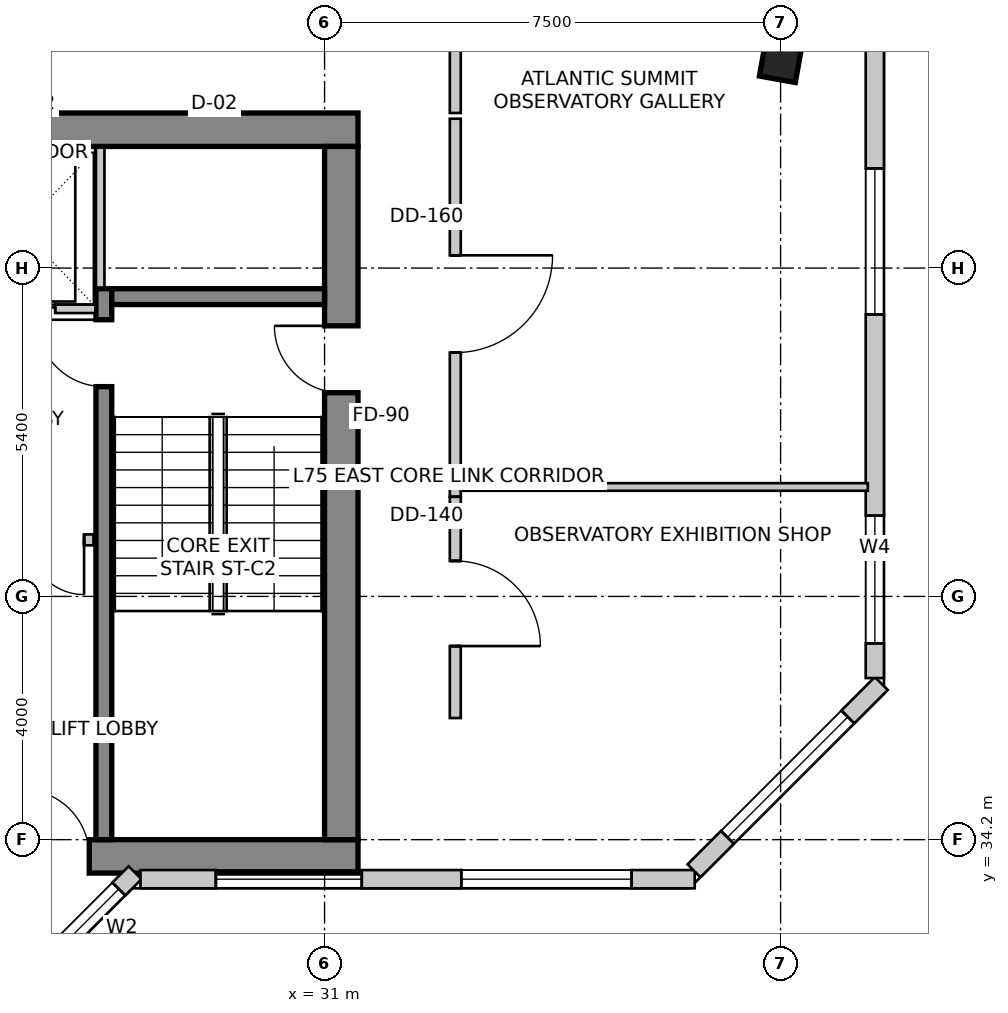
"""IFC4 building model, lengths in metres.
Left out: names, types, materials, properties, quantities, classifications, styles, units other than length and angle.
Written with IfcOpenShell. Run it as: python <this file> out.ifc"""

import sys

from ifc_helpers import new_model, si_unit, direction, frame, frame_2d, origin, origin_2d, place, context, subcontext, project, spatial, rectangle, extrude, source, transform, mapped, element, fill, save


model = new_model("IFC4")
c1 = context("Model", 3, precision=1e-05, world=origin(), true_north=direction((0.0, 1.0)))
c2 = subcontext(c1, "Body", "Model", "MODEL_VIEW")
j1 = project(units=[si_unit("LENGTHUNIT", "METRE"), si_unit("PLANEANGLEUNIT", "RADIAN")], contexts=[c1])
p1 = place(None, origin())
s1 = spatial("IfcSite", under=j1, at=p1, CompositionType="ELEMENT")
p2 = place(p1, origin())
s2 = spatial("IfcBuilding", under=s1, at=p2, CompositionType="ELEMENT")
p3 = place(p2, frame((0.0, 0.0, 292.5)))
s3 = spatial("IfcBuildingStorey", under=s2, at=p3, CompositionType="ELEMENT", Elevation=292.5)
p4 = place(p3, frame((16.05, 45.875, 0.0), z_axis=(0.0, 0.0, 1.0), x_axis=(1.0, 0.0, 0.0)))
e1 = element("IfcWall", 1, at=p4, inside=s3, PredefinedType="SHEAR", context=c2, shape_type="SweptSolid", body=[
    extrude(rectangle(XDim=15.5, YDim=0.55, at=frame_2d((7.75, 0.0))), origin(), (0.0, 0.0, 1.0), 4.0),
])
p5 = place(p3, frame((16.05, 33.925, 0.0), z_axis=(0.0, 0.0, 1.0), x_axis=(1.0, 0.0, 0.0)))
e2 = element("IfcWall", 2, at=p5, inside=s3, PredefinedType="SHEAR", context=c2, shape_type="SweptSolid", body=[
    extrude(rectangle(XDim=15.5, YDim=0.55, at=frame_2d((7.75, 0.0))), origin(), (0.0, 0.0, 1.0), 4.0),
])
m1 = source(origin(), c2, "Body", "SweptSolid", [
    extrude(rectangle(XDim=1.1, YDim=2.15, at=frame_2d((0.55, 1.075))), frame((0.0, 0.285, 0.0), z_axis=(0.0, -1.0, 0.0), x_axis=(1.0, 0.0, 0.0)), (0.0, 0.0, 1.0), 0.57),
])
p6 = place(p5, frame((9.98, 0.0, 0.0)))
e3 = element("IfcOpeningElement", 3, at=p6, cuts=e2, PredefinedType="OPENING", context=c2, shape_type="MappedRepresentation", body=[
    mapped(m1, transform((0.0, 0.0, 0.0), scale=1.0)),
])
p7 = place(p3, frame((31.275, 34.2, 0.0), z_axis=(0.0, 0.0, 1.0), x_axis=(0.0, 1.0, 0.0)))
e4 = element("IfcWall", 4, at=p7, inside=s3, PredefinedType="SHEAR", context=c2, shape_type="SweptSolid", body=[
    extrude(rectangle(XDim=11.4, YDim=0.55, at=frame_2d((5.7, 0.0))), origin(), (0.0, 0.0, 1.0), 4.0),
])
p8 = place(p7, frame((7.35, 0.0, 0.0)))
e5 = element("IfcOpeningElement", 5, at=p8, cuts=e4, PredefinedType="OPENING", context=c2, shape_type="MappedRepresentation", body=[
    mapped(m1, transform((0.0, 0.0, 0.0), scale=1.0)),
])
p9 = place(p3, frame((27.37, 34.2, 0.0), z_axis=(0.0, 0.0, 1.0), x_axis=(0.0, 1.0, 0.0)))
e6 = element("IfcWall", 6, at=p9, inside=s3, PredefinedType="SHEAR", context=c2, shape_type="SweptSolid", body=[
    extrude(rectangle(XDim=9.06, YDim=0.26, at=frame_2d((4.53, 0.0))), origin(), (0.0, 0.0, 1.0), 4.0),
])
m2 = source(origin(), c2, "Body", "SweptSolid", [
    extrude(rectangle(XDim=1.1, YDim=2.15, at=frame_2d((0.55, 1.075))), frame((0.0, 0.14, 0.0), z_axis=(0.0, -1.0, 0.0), x_axis=(1.0, 0.0, 0.0)), (0.0, 0.0, 1.0), 0.28),
])
p10 = place(p9, frame((7.45, 0.0, 0.0)))
e7 = element("IfcOpeningElement", 7, at=p10, cuts=e6, PredefinedType="OPENING", context=c2, shape_type="MappedRepresentation", body=[
    mapped(m2, transform((0.0, 0.0, 0.0), scale=1.0)),
])
p11 = place(p3, frame((27.5, 43.13, 0.0), z_axis=(0.0, 0.0, 1.0), x_axis=(1.0, 0.0, 0.0)))
e8 = element("IfcWall", 8, at=p11, inside=s3, PredefinedType="SHEAR", context=c2, shape_type="SweptSolid", body=[
    extrude(rectangle(XDim=3.5, YDim=0.26, at=frame_2d((1.75, 0.0))), origin(), (0.0, 0.0, 1.0), 4.0),
])
m3 = source(origin(), c2, "Body", "SweptSolid", [
    extrude(rectangle(XDim=0.6, YDim=0.6, at=origin_2d()), origin(), (0.0, 0.0, 1.0), 4.0),
])
p12 = place(p3, frame((38.5, 47.0, 0.0), z_axis=(0.0, 0.0, 1.0), x_axis=(0.984195607969, -0.17708474032, 0.0)))
e9 = element("IfcColumn", 9, at=p12, inside=s3, PredefinedType="COLUMN", context=c2, shape_type="MappedRepresentation", body=[
    mapped(m3, transform((0.0, 0.0, 0.0), scale=1.0)),
])
p13 = place(p3, frame((25.828, 31.6, 0.0), z_axis=(0.0, 0.0, 1.0), x_axis=(0.707106781187, 0.707106781187, 0.0)))
e10 = element("IfcWall", 10, at=p13, inside=s3, PredefinedType="SOLIDWALL", context=c2, shape_type="SweptSolid", body=[
    extrude(rectangle(XDim=2.907, YDim=0.3, at=frame_2d((1.454, 0.0))), origin(), (0.0, 0.0, 1.0), 3.75),
])
m4 = source(origin(), c2, "Body", "SweptSolid", [
    extrude(rectangle(XDim=1.8, YDim=2.1, at=frame_2d((0.9, 1.05))), frame((0.0, 0.16, 0.0), z_axis=(0.0, -1.0, 0.0), x_axis=(1.0, 0.0, 0.0)), (0.0, 0.0, 1.0), 0.32),
])
p14 = place(p13, frame((0.729, 0.0, 0.85)))
e11 = element("IfcOpeningElement", 11, at=p14, cuts=e10, PredefinedType="OPENING", context=c2, shape_type="MappedRepresentation", body=[
    mapped(m4, transform((0.0, 0.0, 0.0), scale=1.0)),
])
p15 = place(p3, frame((27.973, 33.55, 0.0), z_axis=(0.0, 0.0, 1.0), x_axis=(1.0, 0.0, 0.0)))
e12 = element("IfcWall", 12, at=p15, inside=s3, PredefinedType="SOLIDWALL", context=c2, shape_type="SweptSolid", body=[
    extrude(rectangle(XDim=9.115, YDim=0.3, at=frame_2d((4.558, 0.0))), origin(), (0.0, 0.0, 1.0), 3.75),
])
m5 = source(origin(), c2, "Body", "SweptSolid", [
    extrude(rectangle(XDim=2.4, YDim=2.2, at=frame_2d((1.2, 1.1))), frame((0.0, 0.16, 0.0), z_axis=(0.0, -1.0, 0.0), x_axis=(1.0, 0.0, 0.0)), (0.0, 0.0, 1.0), 0.32),
])
p16 = place(p15, frame((1.239, 0.0, 0.85)))
e13 = element("IfcOpeningElement", 13, at=p16, cuts=e12, PredefinedType="OPENING", context=c2, shape_type="MappedRepresentation", body=[
    mapped(m5, transform((0.0, 0.0, 0.0), scale=1.0)),
])
m6 = source(origin(), c2, "Body", "SweptSolid", [
    extrude(rectangle(XDim=2.8, YDim=2.4, at=frame_2d((1.4, 1.2))), frame((0.0, 0.16, 0.0), z_axis=(0.0, -1.0, 0.0), x_axis=(1.0, 0.0, 0.0)), (0.0, 0.0, 1.0), 0.32),
])
p17 = place(p15, frame((5.276, 0.0, 0.85)))
e14 = element("IfcOpeningElement", 14, at=p17, cuts=e12, PredefinedType="OPENING", context=c2, shape_type="MappedRepresentation", body=[
    mapped(m6, transform((0.0, 0.0, 0.0), scale=1.0)),
])
p18 = place(p3, frame((37.076, 33.688, 0.0), z_axis=(0.0, 0.0, 1.0), x_axis=(0.707078757535, 0.707134803727, 0.0)))
e15 = element("IfcWall", 15, at=p18, inside=s3, PredefinedType="SOLIDWALL", context=c2, shape_type="SweptSolid", body=[
    extrude(rectangle(XDim=4.356, YDim=0.3, at=frame_2d((2.178, 0.0))), origin(), (0.0, 0.0, 1.0), 3.75),
])
p19 = place(p18, frame((0.778, 0.0, 0.85)))
e16 = element("IfcOpeningElement", 16, at=p19, cuts=e15, PredefinedType="OPENING", context=c2, shape_type="MappedRepresentation", body=[
    mapped(m6, transform((0.0, 0.0, 0.0), scale=1.0)),
])
p20 = place(p3, frame((40.05, 36.857, 0.0), z_axis=(0.0, 0.0, 1.0), x_axis=(0.0, 1.0, 0.0)))
e17 = element("IfcWall", 17, at=p20, inside=s3, PredefinedType="SOLIDWALL", context=c2, shape_type="SweptSolid", body=[
    extrude(rectangle(XDim=11.318, YDim=0.3, at=frame_2d((5.659, 0.0))), origin(), (0.0, 0.0, 1.0), 3.75),
])
m7 = source(origin(), c2, "Body", "SweptSolid", [
    extrude(rectangle(XDim=2.1, YDim=2.0, at=frame_2d((1.05, 1.0))), frame((0.0, 0.16, 0.0), z_axis=(0.0, -1.0, 0.0), x_axis=(1.0, 0.0, 0.0)), (0.0, 0.0, 1.0), 0.32),
])
p21 = place(p20, frame((0.571, 0.0, 0.85)))
e18 = element("IfcOpeningElement", 18, at=p21, cuts=e17, PredefinedType="OPENING", context=c2, shape_type="MappedRepresentation", body=[
    mapped(m7, transform((0.0, 0.0, 0.0), scale=1.0)),
])
p22 = place(p20, frame((5.981, 0.0, 0.85)))
e19 = element("IfcOpeningElement", 19, at=p22, cuts=e17, PredefinedType="OPENING", context=c2, shape_type="MappedRepresentation", body=[
    mapped(m5, transform((0.0, 0.0, 0.0), scale=1.0)),
])
p23 = place(p3, frame((20.37, 42.93, 0.0), z_axis=(0.0, 0.0, 1.0), x_axis=(1.0, 0.0, 0.0)))
e20 = element("IfcWall", 20, at=p23, inside=s3, PredefinedType="SOLIDWALL", context=c2, shape_type="SweptSolid", body=[
    extrude(rectangle(XDim=6.86, YDim=0.14, at=frame_2d((3.43, 0.0))), origin(), (0.0, 0.0, 1.0), 3.75),
])
m8 = source(origin(), c2, "Body", "SweptSolid", [
    extrude(rectangle(XDim=1.1, YDim=2.15, at=frame_2d((0.55, 1.075))), frame((0.0, 0.08, 0.0), z_axis=(0.0, -1.0, 0.0), x_axis=(1.0, 0.0, 0.0)), (0.0, 0.0, 1.0), 0.16),
])
p24 = place(p23, frame((0.5, 0.0, 0.0)))
e21 = element("IfcOpeningElement", 21, at=p24, cuts=e20, PredefinedType="OPENING", context=c2, shape_type="MappedRepresentation", body=[
    mapped(m8, transform((0.0, 0.0, 0.0), scale=1.0)),
])
p25 = place(p23, frame((2.7, 0.0, 0.0)))
e22 = element("IfcOpeningElement", 22, at=p25, cuts=e20, PredefinedType="OPENING", context=c2, shape_type="MappedRepresentation", body=[
    mapped(m8, transform((0.0, 0.0, 0.0), scale=1.0)),
])
p26 = place(p23, frame((5.1, 0.0, 0.0)))
e23 = element("IfcOpeningElement", 23, at=p26, cuts=e20, PredefinedType="OPENING", context=c2, shape_type="MappedRepresentation", body=[
    mapped(m8, transform((0.0, 0.0, 0.0), scale=1.0)),
])
p27 = place(p3, frame((27.31, 43.28, 0.0), z_axis=(0.0, 0.0, 1.0), x_axis=(0.0, 1.0, 0.0)))
e24 = element("IfcWall", 24, at=p27, inside=s3, PredefinedType="SOLIDWALL", context=c2, shape_type="SweptSolid", body=[
    extrude(rectangle(XDim=2.3, YDim=0.14, at=frame_2d((1.15, 0.0))), origin(), (0.0, 0.0, 1.0), 3.75),
])
p28 = place(p3, frame((27.2, 39.13, 0.0), z_axis=(0.0, 0.0, 1.0), x_axis=(-1.0, 0.0, 0.0)))
e25 = element("IfcWall", 25, at=p28, inside=s3, PredefinedType="PARTITIONING", context=c2, shape_type="SweptSolid", body=[
    extrude(rectangle(XDim=1.21, YDim=0.18, at=frame_2d((0.605, 0.0))), origin(), (0.0, 0.0, 1.0), 3.75),
])
m9 = source(origin(), c2, "Body", "SweptSolid", [
    extrude(rectangle(XDim=0.9, YDim=2.15, at=frame_2d((0.45, 1.075))), frame((0.0, 0.1, 0.0), z_axis=(0.0, -1.0, 0.0), x_axis=(1.0, 0.0, 0.0)), (0.0, 0.0, 1.0), 0.2),
])
p29 = place(p28, frame((0.155, 0.0, 0.0)))
e26 = element("IfcOpeningElement", 26, at=p29, cuts=e25, PredefinedType="OPENING", context=c2, shape_type="MappedRepresentation", body=[
    mapped(m9, transform((0.0, 0.0, 0.0), scale=1.0)),
])
p30 = place(p3, frame((33.15, 47.606, 0.0), z_axis=(0.0, 0.0, 1.0), x_axis=(0.0, -1.0, 0.0)))
e27 = element("IfcWall", 27, at=p30, inside=s3, PredefinedType="PARTITIONING", context=c2, shape_type="SweptSolid", body=[
    extrude(rectangle(XDim=1.456, YDim=0.18, at=frame_2d((0.728, 0.0))), origin(), (0.0, 0.0, 1.0), 3.75),
])
p31 = place(p3, frame((33.15, 46.056, 0.0), z_axis=(0.0, 0.0, 1.0), x_axis=(0.0, -1.0, 0.0)))
e28 = element("IfcWall", 28, at=p31, inside=s3, PredefinedType="PARTITIONING", context=c2, shape_type="SweptSolid", body=[
    extrude(rectangle(XDim=6.216, YDim=0.18, at=frame_2d((3.108, 0.0))), origin(), (0.0, 0.0, 1.0), 3.188),
])
m10 = source(origin(), c2, "Body", "SweptSolid", [
    extrude(rectangle(XDim=1.6, YDim=2.15, at=frame_2d((0.8, 1.075))), frame((0.0, 0.1, 0.0), z_axis=(0.0, -1.0, 0.0), x_axis=(1.0, 0.0, 0.0)), (0.0, 0.0, 1.0), 0.2),
])
p32 = place(p31, frame((2.247, 0.0, 0.0)))
e29 = element("IfcOpeningElement", 29, at=p32, cuts=e28, PredefinedType="OPENING", context=c2, shape_type="MappedRepresentation", body=[
    mapped(m10, transform((0.0, 0.0, 0.0), scale=1.0)),
])
p33 = place(p3, frame((33.15, 39.838, 0.0), z_axis=(0.0, 0.0, 1.0), x_axis=(0.0, -1.0, 0.0)))
e30 = element("IfcWall", 30, at=p33, inside=s3, PredefinedType="PARTITIONING", context=c2, shape_type="SweptSolid", body=[
    extrude(rectangle(XDim=3.638, YDim=0.18, at=frame_2d((1.819, 0.0))), origin(), (0.0, 0.0, 1.0), 3.75),
])
m11 = source(origin(), c2, "Body", "SweptSolid", [
    extrude(rectangle(XDim=1.4, YDim=2.15, at=frame_2d((0.7, 1.075))), frame((0.0, 0.1, 0.0), z_axis=(0.0, -1.0, 0.0), x_axis=(1.0, 0.0, 0.0)), (0.0, 0.0, 1.0), 0.2),
])
p34 = place(p33, frame((1.054, 0.0, 0.0)))
e31 = element("IfcOpeningElement", 31, at=p34, cuts=e30, PredefinedType="OPENING", context=c2, shape_type="MappedRepresentation", body=[
    mapped(m11, transform((0.0, 0.0, 0.0), scale=1.0)),
])
p35 = place(p3, frame((39.935, 40.0, 0.0), z_axis=(0.0, 0.0, 1.0), x_axis=(-1.0, 0.0, 0.0)))
e32 = element("IfcWall", 32, at=p35, inside=s3, PredefinedType="PARTITIONING", context=c2, shape_type="SweptSolid", body=[
    extrude(rectangle(XDim=6.691, YDim=0.125, at=frame_2d((3.346, 0.0))), origin(), (0.0, 0.0, 1.0), 3.75),
])
m12 = source(origin(), c2, "Body", "SweptSolid", [
    extrude(rectangle(XDim=1.8, YDim=2.1, at=frame_2d((0.9, 1.05))), frame((0.0, -0.015, 0.0), z_axis=(0.0, -1.0, 0.0), x_axis=(1.0, 0.0, 0.0)), (0.0, 0.0, 1.0), 0.06),
])
p36 = place(p14, origin())
e33 = element("IfcWindow", 33, at=p36, inside=s3, PartitioningType="SINGLE_PANEL", PredefinedType="WINDOW", context=c2, shape_type="MappedRepresentation", body=[
    mapped(m12, transform((0.0, 0.0, 0.0), scale=1.0)),
])
fill(e11, e33)
m13 = source(origin(), c2, "Body", "SweptSolid", [
    extrude(rectangle(XDim=2.4, YDim=2.2, at=frame_2d((1.2, 1.1))), frame((0.0, -0.015, 0.0), z_axis=(0.0, -1.0, 0.0), x_axis=(1.0, 0.0, 0.0)), (0.0, 0.0, 1.0), 0.06),
])
p37 = place(p16, origin())
e34 = element("IfcWindow", 34, at=p37, inside=s3, PartitioningType="SINGLE_PANEL", PredefinedType="WINDOW", context=c2, shape_type="MappedRepresentation", body=[
    mapped(m13, transform((0.0, 0.0, 0.0), scale=1.0)),
])
fill(e13, e34)
m14 = source(origin(), c2, "Body", "SweptSolid", [
    extrude(rectangle(XDim=2.8, YDim=2.4, at=frame_2d((1.4, 1.2))), frame((0.0, -0.015, 0.0), z_axis=(0.0, -1.0, 0.0), x_axis=(1.0, 0.0, 0.0)), (0.0, 0.0, 1.0), 0.06),
])
p38 = place(p17, origin())
e35 = element("IfcWindow", 35, at=p38, inside=s3, PartitioningType="SINGLE_PANEL", PredefinedType="WINDOW", context=c2, shape_type="MappedRepresentation", body=[
    mapped(m14, transform((0.0, 0.0, 0.0), scale=1.0)),
])
fill(e14, e35)
p39 = place(p19, origin())
e36 = element("IfcWindow", 36, at=p39, inside=s3, PartitioningType="SINGLE_PANEL", PredefinedType="WINDOW", context=c2, shape_type="MappedRepresentation", body=[
    mapped(m14, transform((0.0, 0.0, 0.0), scale=1.0)),
])
fill(e16, e36)
m15 = source(origin(), c2, "Body", "SweptSolid", [
    extrude(rectangle(XDim=2.1, YDim=2.0, at=frame_2d((1.05, 1.0))), frame((0.0, -0.015, 0.0), z_axis=(0.0, -1.0, 0.0), x_axis=(1.0, 0.0, 0.0)), (0.0, 0.0, 1.0), 0.06),
])
p40 = place(p21, origin())
e37 = element("IfcWindow", 37, at=p40, inside=s3, PartitioningType="SINGLE_PANEL", PredefinedType="WINDOW", context=c2, shape_type="MappedRepresentation", body=[
    mapped(m15, transform((0.0, 0.0, 0.0), scale=1.0)),
])
fill(e18, e37)
p41 = place(p22, origin())
e38 = element("IfcWindow", 38, at=p41, inside=s3, PartitioningType="SINGLE_PANEL", PredefinedType="WINDOW", context=c2, shape_type="MappedRepresentation", body=[
    mapped(m13, transform((0.0, 0.0, 0.0), scale=1.0)),
])
fill(e19, e38)
m16 = source(origin(), c2, "Body", "SweptSolid", [
    extrude(rectangle(XDim=1.1, YDim=2.15, at=frame_2d((0.55, 1.075))), frame((0.0, 0.025, 0.0), z_axis=(0.0, -1.0, 0.0), x_axis=(1.0, 0.0, 0.0)), (0.0, 0.0, 1.0), 0.05),
])
p42 = place(p26, origin())
e39 = element("IfcDoor", 39, at=p42, inside=s3, OperationType="SLIDING_TO_LEFT", PredefinedType="DOOR", context=c2, shape_type="MappedRepresentation", body=[
    mapped(m16, transform((0.0, 0.0, 0.0), scale=1.0)),
])
fill(e23, e39)
m17 = source(origin(), c2, "Body", "SweptSolid", [
    extrude(rectangle(XDim=1.1, YDim=2.15, at=frame_2d((0.55, 1.075))), frame((0.0, 0.025, 0.0), z_axis=(0.0, -1.0, 0.0), x_axis=(1.0, 0.0, 0.0)), (0.0, 0.0, 1.0), 0.05),
])
p43 = place(p10, origin())
e40 = element("IfcDoor", 40, at=p43, inside=s3, OperationType="SINGLE_SWING_RIGHT", PredefinedType="DOOR", context=c2, shape_type="MappedRepresentation", body=[
    mapped(m17, transform((0.0, 0.0, 0.0), scale=1.0)),
])
fill(e7, e40)
p44 = place(p8, origin())
e41 = element("IfcDoor", 41, at=p44, inside=s3, OperationType="SINGLE_SWING_RIGHT", PredefinedType="DOOR", context=c2, shape_type="MappedRepresentation", body=[
    mapped(m17, transform((0.0, 0.0, 0.0), scale=1.0)),
])
fill(e5, e41)
p45 = place(p6, origin())
e42 = element("IfcDoor", 42, at=p45, inside=s3, OperationType="SINGLE_SWING_LEFT", PredefinedType="DOOR", context=c2, shape_type="MappedRepresentation", body=[
    mapped(m17, transform((0.0, 0.0, 0.0), scale=1.0)),
])
fill(e3, e42)
m18 = source(origin(), c2, "Body", "SweptSolid", [
    extrude(rectangle(XDim=0.9, YDim=2.15, at=frame_2d((0.45, 1.075))), frame((0.0, 0.025, 0.0), z_axis=(0.0, -1.0, 0.0), x_axis=(1.0, 0.0, 0.0)), (0.0, 0.0, 1.0), 0.05),
])
p46 = place(p29, origin())
e43 = element("IfcDoor", 43, at=p46, inside=s3, OperationType="SINGLE_SWING_LEFT", PredefinedType="DOOR", context=c2, shape_type="MappedRepresentation", body=[
    mapped(m18, transform((0.0, 0.0, 0.0), scale=1.0)),
])
fill(e26, e43)
m19 = source(origin(), c2, "Body", "SweptSolid", [
    extrude(rectangle(XDim=1.6, YDim=2.15, at=frame_2d((0.8, 1.075))), frame((0.0, 0.025, 0.0), z_axis=(0.0, -1.0, 0.0), x_axis=(1.0, 0.0, 0.0)), (0.0, 0.0, 1.0), 0.05),
])
p47 = place(p32, origin())
e44 = element("IfcDoor", 44, at=p47, inside=s3, OperationType="SINGLE_SWING_LEFT", PredefinedType="DOOR", context=c2, shape_type="MappedRepresentation", body=[
    mapped(m19, transform((0.0, 0.0, 0.0), scale=1.0)),
])
fill(e29, e44)
m20 = source(origin(), c2, "Body", "SweptSolid", [
    extrude(rectangle(XDim=1.4, YDim=2.15, at=frame_2d((0.7, 1.075))), frame((0.0, 0.025, 0.0), z_axis=(0.0, -1.0, 0.0), x_axis=(1.0, 0.0, 0.0)), (0.0, 0.0, 1.0), 0.05),
])
p48 = place(p34, origin())
e45 = element("IfcDoor", 45, at=p48, inside=s3, OperationType="SINGLE_SWING_RIGHT", PredefinedType="DOOR", context=c2, shape_type="MappedRepresentation", body=[
    mapped(m20, transform((0.0, 0.0, 0.0), scale=1.0)),
])
fill(e31, e45)
save(model, sys.argv[1])
